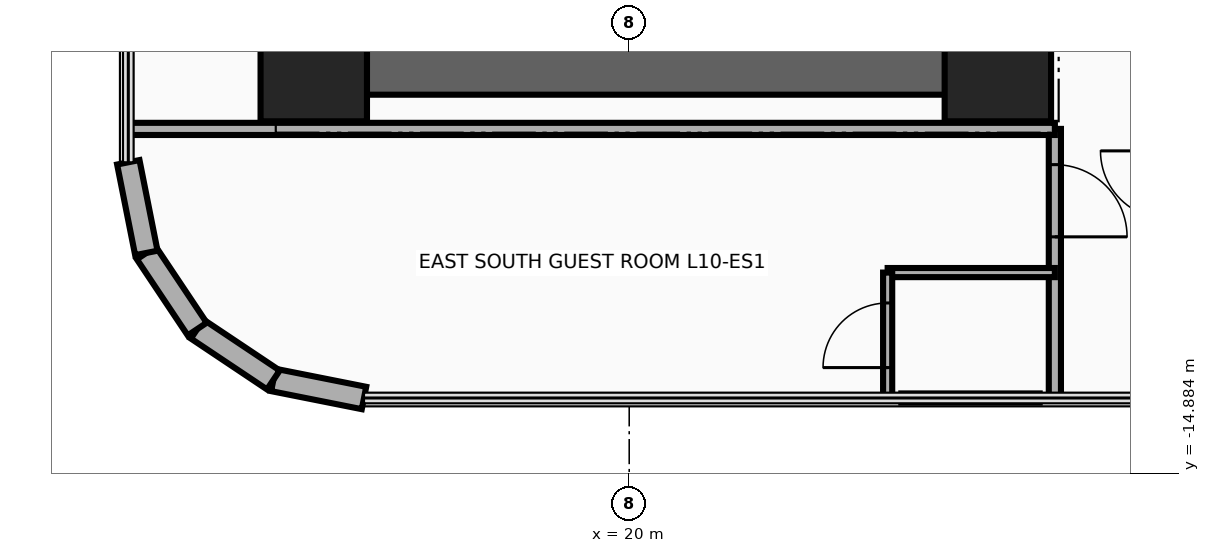
"""IFC4 building model, lengths in metres.
Left out: names, types, materials, properties, quantities, classifications, styles, units other than length and angle.
Written with IfcOpenShell. Run it as: python <this file> out.ifc"""

import sys

from ifc_helpers import new_model, si_unit, direction, frame, frame_2d, origin, origin_2d, place, context, subcontext, project, spatial, rectangle, extrude, source, transform, mapped, element, fill, save


model = new_model("IFC4")
c1 = context("Model", 3, precision=1e-05, world=origin(), true_north=direction((0.0, 1.0)))
c2 = subcontext(c1, "Body", "Model", "MODEL_VIEW")
j1 = project(units=[si_unit("LENGTHUNIT", "METRE"), si_unit("PLANEANGLEUNIT", "RADIAN")], contexts=[c1])
p1 = place(None, origin())
s1 = spatial("IfcSite", under=j1, at=p1, CompositionType="ELEMENT")
p2 = place(p1, origin())
s2 = spatial("IfcBuilding", under=s1, at=p2, CompositionType="ELEMENT")
p3 = place(p2, frame((0.0, 0.0, 44.5)))
s3 = spatial("IfcBuildingStorey", under=s2, at=p3, CompositionType="ELEMENT", Elevation=44.5)
p4 = place(p3, frame((24.85, -9.9, 0.0), z_axis=(0.0, 0.0, 1.0), x_axis=(0.0, 1.0, 0.0)))
e1 = element("IfcWall", 1, at=p4, inside=s3, PredefinedType="SHEAR", context=c2, shape_type="SweptSolid", body=[
    extrude(rectangle(XDim=8.95, YDim=0.7, at=frame_2d((4.475, 0.0))), origin(), (0.0, 0.0, 1.0), 3.46),
])
p5 = place(p3, frame((15.85, -9.55, 0.0), z_axis=(0.0, 0.0, 1.0), x_axis=(1.0, 0.0, 0.0)))
e2 = element("IfcWall", 2, at=p5, inside=s3, PredefinedType="SHEAR", context=c2, shape_type="SweptSolid", body=[
    extrude(rectangle(XDim=9.0, YDim=0.7, at=frame_2d((4.5, 0.0))), origin(), (0.0, 0.0, 1.0), 3.46),
])
m1 = source(origin(), c2, "Body", "SweptSolid", [
    extrude(rectangle(XDim=1.4, YDim=1.4, at=origin_2d()), origin(), (0.0, 0.0, 1.0), 3.7),
])
for number, where, z_axis, x_axis in (
    (3, (15.85, -9.55, 0.0), (0.0, 0.0, 1.0), (1.0, 0.0, 0.0)),
    (4, (24.85, -9.55, 0.0), (0.0, 0.0, 1.0), (1.0, 0.0, 0.0)),
):
    element("IfcColumn", number, at=place(p3, frame(where, z_axis=z_axis, x_axis=x_axis)), inside=s3, PredefinedType="COLUMN", context=c2, shape_type="MappedRepresentation", body=[
        mapped(m1, transform((0.0, 0.0, 0.0), x_axis=(1.0, 0.0, 0.0), y_axis=(0.0, 1.0, 0.0), z_axis=(0.0, 0.0, 1.0), scale=1.0)),
    ])
p6 = place(p3, frame((16.511, -13.89, 0.0), z_axis=(0.0, 0.0, 1.0), x_axis=(-0.980804027463, 0.194996050505, 0.0)))
e5 = element("IfcWall", 5, at=p6, inside=s3, PredefinedType="SOLIDWALL", context=c2, shape_type="SweptSolid", body=[
    extrude(rectangle(XDim=1.216, YDim=0.3, at=frame_2d((0.608, 0.0))), origin(), (0.0, 0.0, 1.0), 3.46),
])
for number, where, z_axis, x_axis in (
    (6, (15.318, -13.653, 0.0), (0.0, 0.0, 1.0), (-0.831, 0.556, 0.0)),
    (7, (14.317, -12.983, 0.0), (0.0, 0.0, 1.0), (-0.556, 0.831, 0.0)),
):
    element("IfcWall", number, at=place(p3, frame(where, z_axis=z_axis, x_axis=x_axis)), inside=s3, PredefinedType="SOLIDWALL", context=c2, shape_type="SweptSolid", body=[
        extrude(rectangle(XDim=1.205, YDim=0.3, at=frame_2d((0.603, 0.0))), origin(), (0.0, 0.0, 1.0), 3.46),
    ])
p7 = place(p3, frame((13.647, -11.982, 0.0), z_axis=(0.0, 0.0, 1.0), x_axis=(-0.195189223115, 0.980765602568, 0.0)))
e8 = element("IfcWall", 8, at=p7, inside=s3, PredefinedType="SOLIDWALL", context=c2, shape_type="SweptSolid", body=[
    extrude(rectangle(XDim=1.216, YDim=0.3, at=frame_2d((0.608, 0.0))), origin(), (0.0, 0.0, 1.0), 3.46),
])
p8 = place(p3, frame((25.6, -13.89, 0.0), z_axis=(0.0, 0.0, 1.0), x_axis=(0.0, 1.0, 0.0)))
e9 = element("IfcWall", 9, at=p8, inside=s3, PredefinedType="PARTITIONING", context=c2, shape_type="SweptSolid", body=[
    extrude(rectangle(XDim=3.54, YDim=0.16, at=frame_2d((1.77, 0.0))), origin(), (0.0, 0.0, 1.0), 3.46),
])
p9 = place(p8, frame((2.12, 0.0, 0.0)))
e10 = element("IfcOpeningElement", 10, at=p9, cuts=e9, PredefinedType="OPENING", context=c2, shape_type="SweptSolid", body=[
    extrude(rectangle(XDim=0.95, YDim=2.15, at=frame_2d((0.475, 1.075))), frame((0.0, 0.095, 0.0), z_axis=(0.0, -1.0, 0.0), x_axis=(1.0, 0.0, 0.0)), (0.0, 0.0, 1.0), 0.19),
])
p10 = place(p3, frame((13.41, -10.35, 0.0), z_axis=(0.0, 0.0, 1.0), x_axis=(1.0, 0.0, 0.0)))
e11 = element("IfcWall", 11, at=p10, inside=s3, PredefinedType="PARTITIONING", context=c2, shape_type="SweptSolid", body=[
    extrude(rectangle(XDim=12.19, YDim=0.16, at=frame_2d((6.095, 0.0))), origin(), (0.0, 0.0, 1.0), 3.46),
])
p11 = place(p3, frame((23.4, -12.24, 0.0), z_axis=(0.0, 0.0, 1.0), x_axis=(1.0, 0.0, 0.0)))
e12 = element("IfcWall", 12, at=p11, inside=s3, PredefinedType="PARTITIONING", context=c2, shape_type="SweptSolid", body=[
    extrude(rectangle(XDim=2.2, YDim=0.12, at=frame_2d((1.1, 0.0))), origin(), (0.0, 0.0, 1.0), 3.46),
])
p12 = place(p3, frame((23.4, -13.89, 0.0), z_axis=(0.0, 0.0, 1.0), x_axis=(0.0, 1.0, 0.0)))
e13 = element("IfcWall", 13, at=p12, inside=s3, PredefinedType="PARTITIONING", context=c2, shape_type="SweptSolid", body=[
    extrude(rectangle(XDim=1.65, YDim=0.12, at=frame_2d((0.825, 0.0))), origin(), (0.0, 0.0, 1.0), 3.46),
])
p13 = place(p12, frame((0.4, 0.0, 0.0)))
e14 = element("IfcOpeningElement", 14, at=p13, cuts=e13, PredefinedType="OPENING", context=c2, shape_type="SweptSolid", body=[
    extrude(rectangle(XDim=0.85, YDim=2.1, at=frame_2d((0.425, 1.05))), frame((0.0, 0.075, 0.0), z_axis=(0.0, -1.0, 0.0), x_axis=(1.0, 0.0, 0.0)), (0.0, 0.0, 1.0), 0.15),
])
p14 = place(p3, frame((23.58, -13.89, 0.0), z_axis=(0.0, 0.0, 1.0), x_axis=(1.0, 0.0, 0.0)))
e15 = element("IfcWall", 15, at=p14, inside=s3, PredefinedType="PARTITIONING", context=c2, shape_type="SweptSolid", body=[
    extrude(rectangle(XDim=1.82, YDim=0.12, at=frame_2d((0.91, 0.0))), origin(), (0.0, 0.0, 1.0), 3.46),
])
p15 = place(p9, frame((0.95, 0.0, 0.0), z_axis=(0.0, 0.0, 1.0), x_axis=(-1.0, 0.0, 0.0)))
e16 = element("IfcDoor", 16, at=p15, inside=s3, OperationType="SINGLE_SWING_LEFT", PredefinedType="DOOR", context=c2, shape_type="SweptSolid", body=[
    extrude(rectangle(XDim=0.95, YDim=2.15, at=frame_2d((0.475, 1.075))), frame((0.0, 0.025, 0.0), z_axis=(0.0, -1.0, 0.0), x_axis=(1.0, 0.0, 0.0)), (0.0, 0.0, 1.0), 0.05),
])
fill(e10, e16)
p16 = place(p13, origin())
e17 = element("IfcDoor", 17, at=p16, inside=s3, OperationType="SINGLE_SWING_RIGHT", PredefinedType="DOOR", context=c2, shape_type="SweptSolid", body=[
    extrude(rectangle(XDim=0.85, YDim=2.1, at=frame_2d((0.425, 1.05))), frame((0.0, 0.025, 0.0), z_axis=(0.0, -1.0, 0.0), x_axis=(1.0, 0.0, 0.0)), (0.0, 0.0, 1.0), 0.05),
])
fill(e14, e17)
save(model, sys.argv[1])
